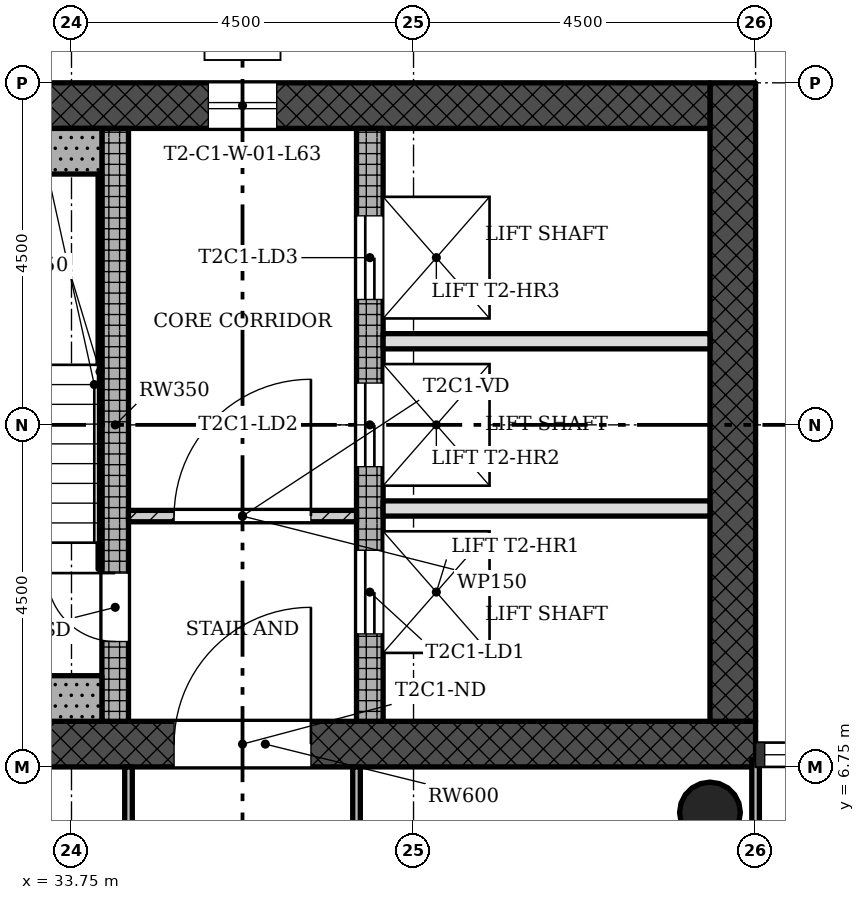
"""IFC4 building model, lengths in metres.
Left out: names, types, materials, properties, quantities, classifications, styles, units other than length and angle.
Written with IfcOpenShell. Run it as: python <this file> out.ifc"""

import sys

from ifc_helpers import new_model, si_unit, direction, frame, frame_2d, origin, origin_2d, place, context, subcontext, project, spatial, rectangle, hollow_circle, extrude, element, fill, save


model = new_model("IFC4")
c1 = context("Model", 3, precision=1e-05, world=origin(), true_north=direction((0.0, 1.0)))
c2 = subcontext(c1, "Body", "Model", "MODEL_VIEW")
j1 = project(units=[si_unit("LENGTHUNIT", "METRE"), si_unit("PLANEANGLEUNIT", "RADIAN")], contexts=[c1])
p1 = place(None, origin())
s1 = spatial("IfcSite", under=j1, at=p1, CompositionType="ELEMENT")
p2 = place(p1, origin())
s2 = spatial("IfcBuilding", under=s1, at=p2, CompositionType="ELEMENT")
p3 = place(p2, frame((0.0, 0.0, 226.6)))
s3 = spatial("IfcBuildingStorey", under=s2, at=p3, CompositionType="ELEMENT", Elevation=226.6)
p4 = place(p3, frame((29.85, 7.05, 0.0), z_axis=(0.0, 0.0, 1.0), x_axis=(1.0, 0.0, 0.0)))
e1 = element("IfcWall", 1, at=p4, inside=s3, PredefinedType="SHEAR", context=c2, shape_type="SweptSolid", body=[
    extrude(rectangle(XDim=12.9, YDim=0.6, at=frame_2d((6.45, 0.0))), origin(), (0.0, 0.0, 1.0), 3.4),
])
p5 = place(p4, frame((5.25, 0.0, 0.0)))
e2 = element("IfcOpeningElement", 2, at=p5, cuts=e1, PredefinedType="OPENING", context=c2, shape_type="SweptSolid", body=[
    extrude(rectangle(XDim=1.8, YDim=2.1, at=frame_2d((0.9, 1.05))), frame((0.0, 0.31, 0.0), z_axis=(0.0, -1.0, 0.0), x_axis=(1.0, 0.0, 0.0)), (0.0, 0.0, 1.0), 0.62),
])
p6 = place(p3, frame((42.45, 7.35, 0.0), z_axis=(0.0, 0.0, 1.0), x_axis=(0.0, 1.0, 0.0)))
e3 = element("IfcWall", 3, at=p6, inside=s3, PredefinedType="SHEAR", context=c2, shape_type="SweptSolid", body=[
    extrude(rectangle(XDim=8.4, YDim=0.6, at=frame_2d((4.2, 0.0))), origin(), (0.0, 0.0, 1.0), 3.4),
])
p7 = place(p3, frame((42.15, 15.45, 0.0), z_axis=(0.0, 0.0, 1.0), x_axis=(-1.0, 0.0, 0.0)))
e4 = element("IfcWall", 4, at=p7, inside=s3, PredefinedType="SHEAR", context=c2, shape_type="SweptSolid", body=[
    extrude(rectangle(XDim=12.9, YDim=0.6, at=frame_2d((6.45, 0.0))), origin(), (0.0, 0.0, 1.0), 3.4),
])
p8 = place(p7, frame((5.7, 0.0, 0.45)))
e5 = element("IfcOpeningElement", 5, at=p8, cuts=e4, PredefinedType="OPENING", context=c2, shape_type="SweptSolid", body=[
    extrude(rectangle(XDim=0.9, YDim=2.4, at=frame_2d((0.45, 1.2))), frame((0.0, 0.31, 0.0), z_axis=(0.0, -1.0, 0.0), x_axis=(1.0, 0.0, 0.0)), (0.0, 0.0, 1.0), 0.62),
])
p9 = place(p3, frame((34.325, 7.35, 0.0), z_axis=(0.0, 0.0, 1.0), x_axis=(0.0, 1.0, 0.0)))
e6 = element("IfcWall", 6, at=p9, inside=s3, PredefinedType="SHEAR", context=c2, shape_type="SweptSolid", body=[
    extrude(rectangle(XDim=7.8, YDim=0.35, at=frame_2d((3.9, 0.0))), origin(), (0.0, 0.0, 1.0), 3.4),
])
p10 = place(p9, frame((1.05, 0.0, 0.0)))
e7 = element("IfcOpeningElement", 7, at=p10, cuts=e6, PredefinedType="OPENING", context=c2, shape_type="SweptSolid", body=[
    extrude(rectangle(XDim=0.9, YDim=2.1, at=frame_2d((0.45, 1.05))), frame((0.0, 0.185, 0.0), z_axis=(0.0, -1.0, 0.0), x_axis=(1.0, 0.0, 0.0)), (0.0, 0.0, 1.0), 0.37),
])
p11 = place(p3, frame((37.675, 7.35, 0.0), z_axis=(0.0, 0.0, 1.0), x_axis=(0.0, 1.0, 0.0)))
e8 = element("IfcWall", 8, at=p11, inside=s3, PredefinedType="SHEAR", context=c2, shape_type="SweptSolid", body=[
    extrude(rectangle(XDim=7.8, YDim=0.35, at=frame_2d((3.9, 0.0))), origin(), (0.0, 0.0, 1.0), 3.4),
])
p12 = place(p11, frame((1.15, 0.0, 0.0)))
e9 = element("IfcOpeningElement", 9, at=p12, cuts=e8, PredefinedType="OPENING", context=c2, shape_type="SweptSolid", body=[
    extrude(rectangle(XDim=1.1, YDim=2.1, at=frame_2d((0.55, 1.05))), frame((0.0, 0.185, 0.0), z_axis=(0.0, -1.0, 0.0), x_axis=(1.0, 0.0, 0.0)), (0.0, 0.0, 1.0), 0.37),
])
p13 = place(p11, frame((3.35, 0.0, 0.0)))
e10 = element("IfcOpeningElement", 10, at=p13, cuts=e8, PredefinedType="OPENING", context=c2, shape_type="SweptSolid", body=[
    extrude(rectangle(XDim=1.1, YDim=2.1, at=frame_2d((0.55, 1.05))), frame((0.0, 0.185, 0.0), z_axis=(0.0, -1.0, 0.0), x_axis=(1.0, 0.0, 0.0)), (0.0, 0.0, 1.0), 0.37),
])
p14 = place(p11, frame((5.55, 0.0, 0.0)))
e11 = element("IfcOpeningElement", 11, at=p14, cuts=e8, PredefinedType="OPENING", context=c2, shape_type="SweptSolid", body=[
    extrude(rectangle(XDim=1.1, YDim=2.1, at=frame_2d((0.55, 1.05))), frame((0.0, 0.185, 0.0), z_axis=(0.0, -1.0, 0.0), x_axis=(1.0, 0.0, 0.0)), (0.0, 0.0, 1.0), 0.37),
])
p15 = place(p3, frame((42.15, 6.15, 0.0), z_axis=(0.0, 0.0, 1.0), x_axis=(1.0, 0.0, 0.0)))
e12 = element("IfcColumn", 12, at=p15, inside=s3, PredefinedType="COLUMN", context=c2, shape_type="SweptSolid", body=[
    extrude(hollow_circle(Radius=0.4, WallThickness=0.028, at=origin_2d()), origin(), (0.0, 0.0, 1.0), 3.4),
])
p16 = place(p3, frame((37.5, 10.05, 0.0), z_axis=(0.0, 0.0, 1.0), x_axis=(-1.0, 0.0, 0.0)))
e13 = element("IfcWall", 13, at=p16, inside=s3, PredefinedType="PARTITIONING", context=c2, shape_type="SweptSolid", body=[
    extrude(rectangle(XDim=3.0, YDim=0.15, at=frame_2d((1.5, 0.0))), origin(), (0.0, 0.0, 1.0), 3.0),
])
p17 = place(p16, frame((0.6, 0.0, 0.0)))
e14 = element("IfcOpeningElement", 14, at=p17, cuts=e13, PredefinedType="OPENING", context=c2, shape_type="SweptSolid", body=[
    extrude(rectangle(XDim=1.8, YDim=2.1, at=frame_2d((0.9, 1.05))), frame((0.0, 0.085, 0.0), z_axis=(0.0, -1.0, 0.0), x_axis=(1.0, 0.0, 0.0)), (0.0, 0.0, 1.0), 0.17),
])
for number, where, z_axis, x_axis in (
    (15, (42.15, 10.15, 0.0), (0.0, 0.0, 1.0), (-1.0, 0.0, 0.0)),
    (16, (42.15, 12.35, 0.0), (0.0, 0.0, 1.0), (-1.0, 0.0, 0.0)),
):
    element("IfcWall", number, at=place(p3, frame(where, z_axis=z_axis, x_axis=x_axis)), inside=s3, PredefinedType="SOLIDWALL", context=c2, shape_type="SweptSolid", body=[
        extrude(rectangle(XDim=4.3, YDim=0.2, at=frame_2d((2.15, 0.0))), origin(), (0.0, 0.0, 1.0), 3.0),
    ])
p18 = place(p3, frame((42.75, 0.9, 0.0), z_axis=(0.0, 0.0, 1.0), x_axis=(0.0, 1.0, 0.0)))
e17 = element("IfcWall", 17, at=p18, inside=s3, PredefinedType="PARTITIONING", context=c2, shape_type="SweptSolid", body=[
    extrude(rectangle(XDim=5.95, YDim=0.1, at=frame_2d((2.975, 0.0))), origin(), (0.0, 0.0, 1.0), 3.0),
])
for number, where, z_axis, x_axis in (
    (18, (37.5, 4.5, 0.0), (0.0, 0.0, 1.0), (0.0, 1.0, 0.0)),
    (19, (34.5, 4.5, 0.0), (0.0, 0.0, 1.0), (0.0, 1.0, 0.0)),
):
    element("IfcWall", number, at=place(p3, frame(where, z_axis=z_axis, x_axis=x_axis)), inside=s3, PredefinedType="PARTITIONING", context=c2, shape_type="SweptSolid", body=[
        extrude(rectangle(XDim=2.25, YDim=0.1, at=frame_2d((1.125, 0.0))), origin(), (0.0, 0.0, 1.0), 3.0),
    ])
for number, where, z_axis, x_axis in (
    (20, (34.15, 14.85, 0.0), (0.0, 0.0, 1.0), (-1.0, 0.0, 0.0)),
    (21, (34.15, 7.65, 0.0), (0.0, 0.0, 1.0), (-1.0, 0.0, 0.0)),
):
    element("IfcWall", number, at=place(p3, frame(where, z_axis=z_axis, x_axis=x_axis)), inside=s3, PredefinedType="SHEAR", context=c2, shape_type="SweptSolid", body=[
        extrude(rectangle(XDim=4.3, YDim=0.6, at=frame_2d((2.15, 0.0))), origin(), (0.0, 0.0, 1.0), 3.4),
    ])
p19 = place(p3, frame((34.125, 9.35, 0.0), z_axis=(0.0, 0.0, 1.0), x_axis=(0.0, 1.0, 0.0)))
e22 = element("IfcWall", 22, at=p19, inside=s3, PredefinedType="SHEAR", context=c2, shape_type="SweptSolid", body=[
    extrude(rectangle(XDim=5.2, YDim=0.05, at=frame_2d((2.6, 0.0))), origin(), (0.0, 0.0, 1.0), 3.4),
])
p20 = place(p8, origin())
e23 = element("IfcWindow", 23, at=p20, inside=s3, PartitioningType="SINGLE_PANEL", PredefinedType="WINDOW", context=c2, shape_type="SweptSolid", body=[
    extrude(rectangle(XDim=0.9, YDim=2.4, at=frame_2d((0.45, 1.2))), frame((0.0, 0.03, 0.0), z_axis=(0.0, -1.0, 0.0), x_axis=(1.0, 0.0, 0.0)), (0.0, 0.0, 1.0), 0.06),
])
fill(e5, e23)
p21 = place(p17, origin())
e24 = element("IfcDoor", 24, at=p21, inside=s3, OperationType="SINGLE_SWING_LEFT", PredefinedType="DOOR", context=c2, shape_type="SweptSolid", body=[
    extrude(rectangle(XDim=1.8, YDim=2.1, at=frame_2d((0.9, 1.05))), frame((0.0, 0.025, 0.0), z_axis=(0.0, -1.0, 0.0), x_axis=(1.0, 0.0, 0.0)), (0.0, 0.0, 1.0), 0.05),
])
fill(e14, e24)
p22 = place(p10, origin())
e25 = element("IfcDoor", 25, at=p22, inside=s3, OperationType="SINGLE_SWING_LEFT", PredefinedType="DOOR", context=c2, shape_type="SweptSolid", body=[
    extrude(rectangle(XDim=0.9, YDim=2.1, at=frame_2d((0.45, 1.05))), frame((0.0, 0.025, 0.0), z_axis=(0.0, -1.0, 0.0), x_axis=(1.0, 0.0, 0.0)), (0.0, 0.0, 1.0), 0.05),
])
fill(e7, e25)
p23 = place(p12, origin())
e26 = element("IfcDoor", 26, at=p23, inside=s3, OperationType="SLIDING_TO_LEFT", PredefinedType="DOOR", context=c2, shape_type="SweptSolid", body=[
    extrude(rectangle(XDim=1.1, YDim=2.1, at=frame_2d((0.55, 1.05))), frame((0.0, 0.025, 0.0), z_axis=(0.0, -1.0, 0.0), x_axis=(1.0, 0.0, 0.0)), (0.0, 0.0, 1.0), 0.05),
])
fill(e9, e26)
p24 = place(p13, origin())
e27 = element("IfcDoor", 27, at=p24, inside=s3, OperationType="SLIDING_TO_LEFT", PredefinedType="DOOR", context=c2, shape_type="SweptSolid", body=[
    extrude(rectangle(XDim=1.1, YDim=2.1, at=frame_2d((0.55, 1.05))), frame((0.0, 0.025, 0.0), z_axis=(0.0, -1.0, 0.0), x_axis=(1.0, 0.0, 0.0)), (0.0, 0.0, 1.0), 0.05),
])
fill(e10, e27)
p25 = place(p14, origin())
e28 = element("IfcDoor", 28, at=p25, inside=s3, OperationType="SLIDING_TO_LEFT", PredefinedType="DOOR", context=c2, shape_type="SweptSolid", body=[
    extrude(rectangle(XDim=1.1, YDim=2.1, at=frame_2d((0.55, 1.05))), frame((0.0, 0.025, 0.0), z_axis=(0.0, -1.0, 0.0), x_axis=(1.0, 0.0, 0.0)), (0.0, 0.0, 1.0), 0.05),
])
fill(e11, e28)
p26 = place(p5, origin())
e29 = element("IfcDoor", 29, at=p26, inside=s3, OperationType="SINGLE_SWING_LEFT", PredefinedType="DOOR", context=c2, shape_type="SweptSolid", body=[
    extrude(rectangle(XDim=1.8, YDim=2.1, at=frame_2d((0.9, 1.05))), frame((0.0, 0.025, 0.0), z_axis=(0.0, -1.0, 0.0), x_axis=(1.0, 0.0, 0.0)), (0.0, 0.0, 1.0), 0.05),
])
fill(e2, e29)
save(model, sys.argv[1])
